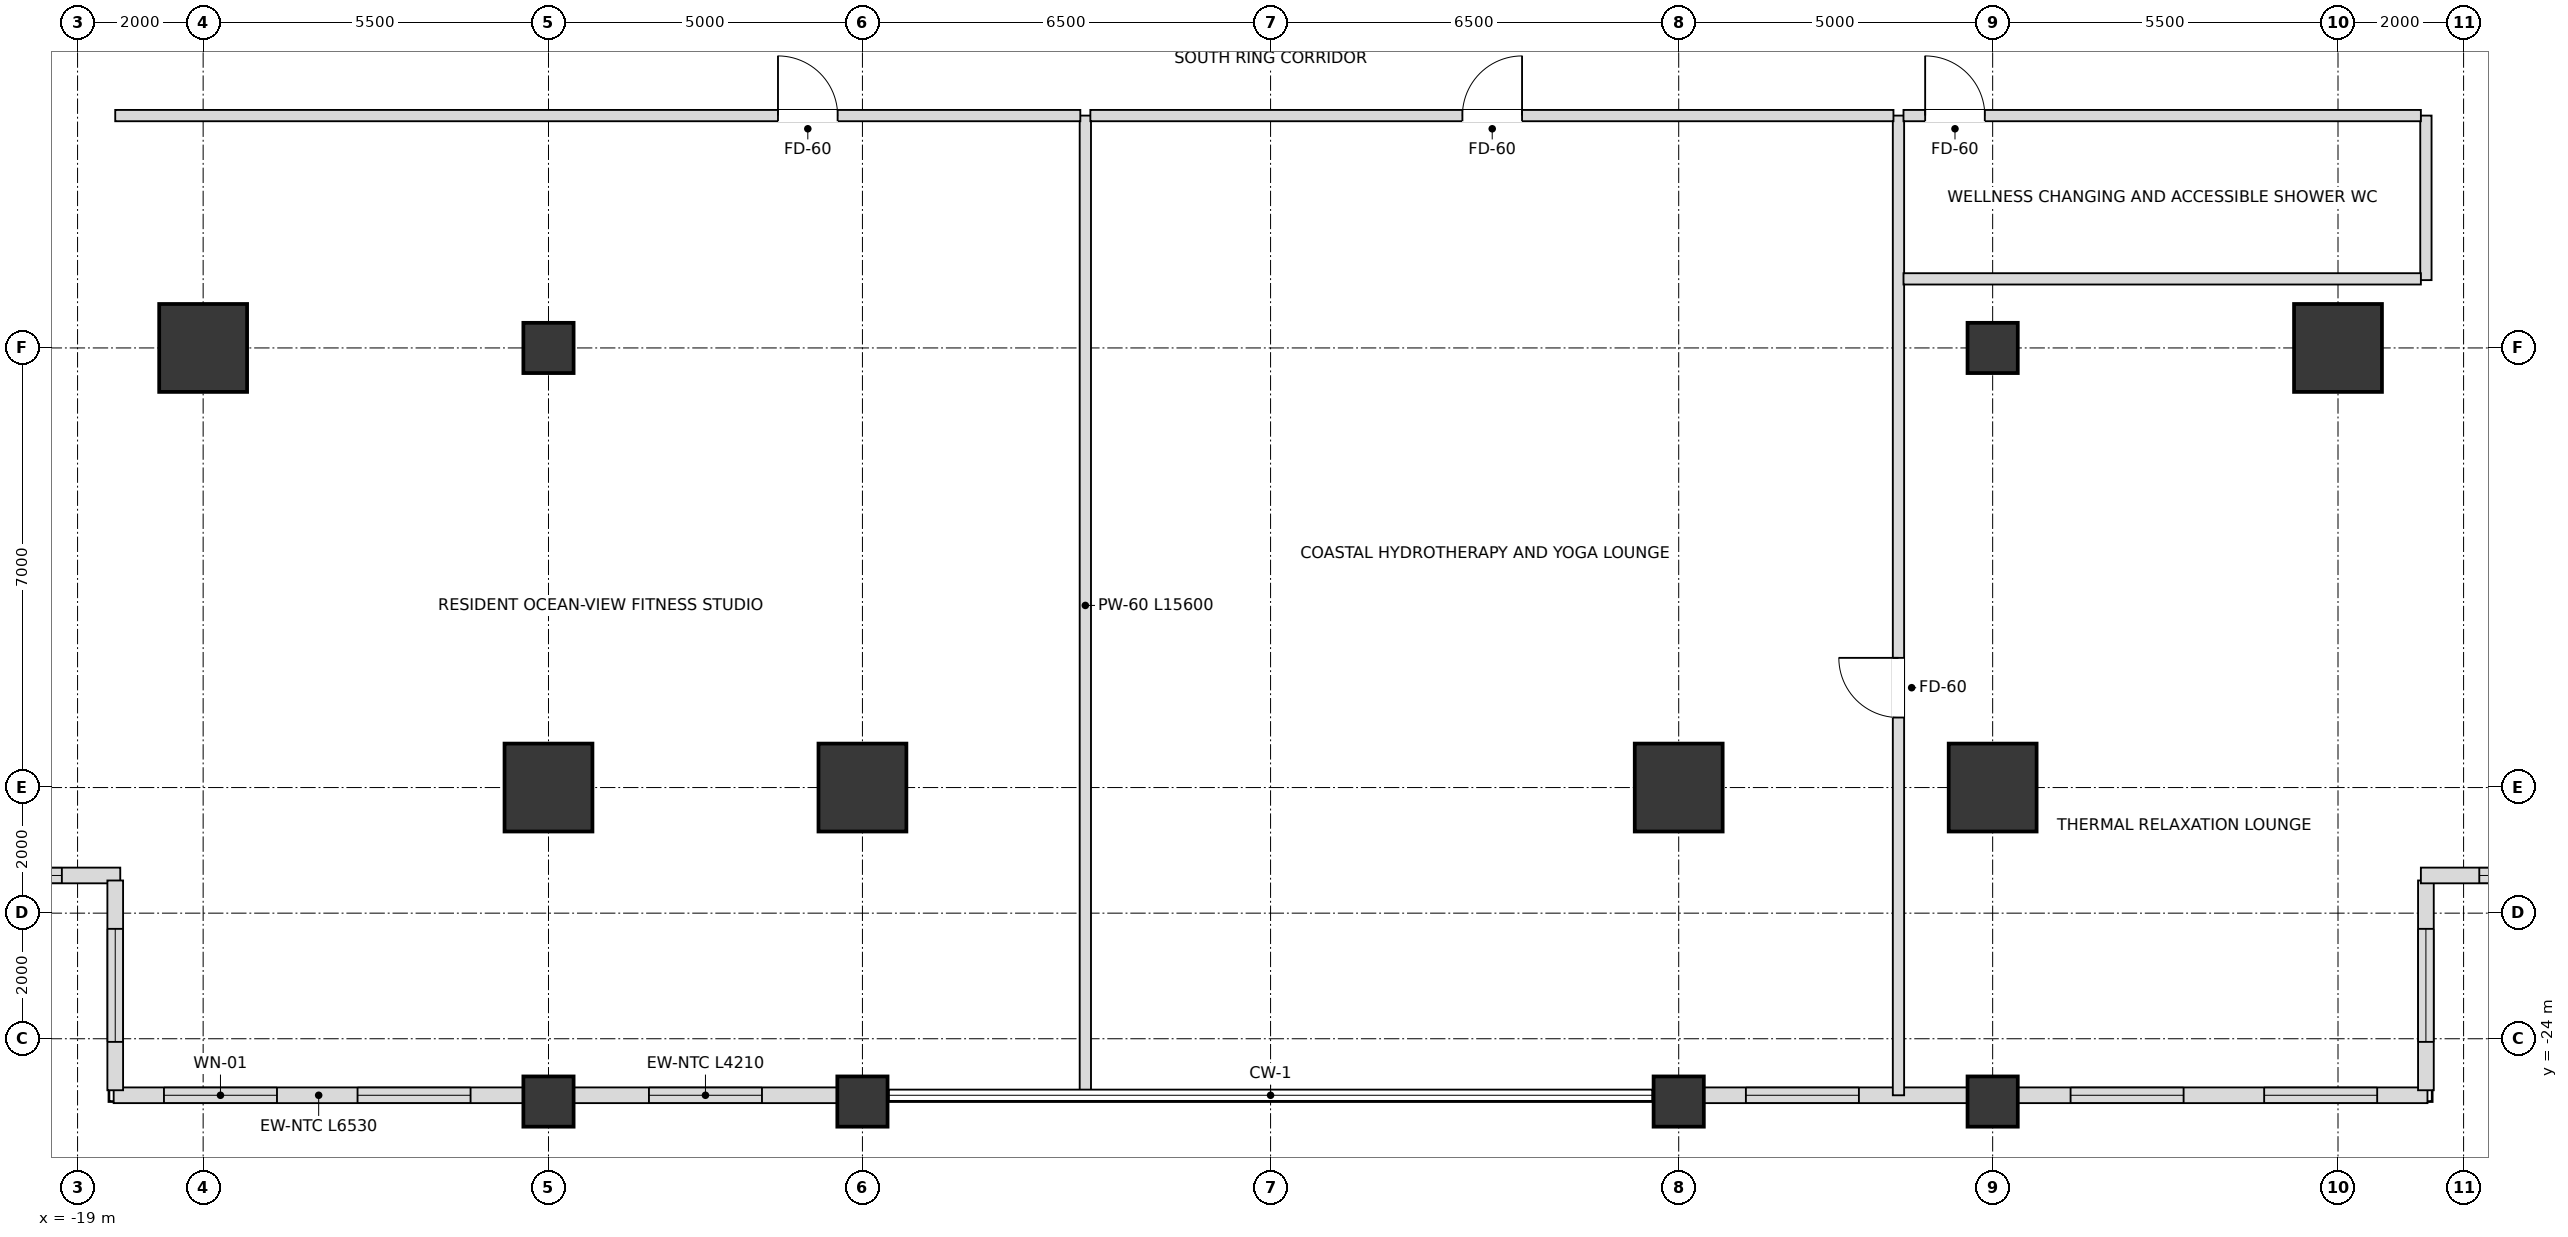
"""IFC4 building model, lengths in metres.
Left out: names, types, materials, properties, quantities, classifications, styles, units other than length and angle.
Written with IfcOpenShell. Run it as: python <this file> out.ifc"""

import sys

from ifc_helpers import new_model, si_unit, direction, frame, frame_2d, origin, origin_2d, place, context, subcontext, project, spatial, rectangle, extrude, element, fill, save


model = new_model("IFC4")
c1 = context("Model", 3, precision=1e-05, world=origin(), true_north=direction((0.0, 1.0)))
c2 = subcontext(c1, "Body", "Model", "MODEL_VIEW")
j1 = project(units=[si_unit("LENGTHUNIT", "METRE"), si_unit("PLANEANGLEUNIT", "RADIAN")], contexts=[c1])
p1 = place(None, origin())
s1 = spatial("IfcSite", under=j1, at=p1, CompositionType="ELEMENT")
p2 = place(p1, origin())
s2 = spatial("IfcBuilding", under=s1, at=p2, CompositionType="ELEMENT")
p3 = place(p2, frame((0.0, 0.0, 86.4)))
s3 = spatial("IfcBuildingStorey", under=s2, at=p3, CompositionType="ELEMENT", Elevation=86.4)
for number, where, z_axis, x_axis in (
    (1, (-11.5, -20.0, 0.0), (0.0, 0.0, 1.0), (1.0, 0.0, 0.0)),
    (2, (-6.5, -20.0, 0.0), (0.0, 0.0, 1.0), (1.0, 0.0, 0.0)),
    (3, (6.5, -20.0, 0.0), (0.0, 0.0, 1.0), (1.0, 0.0, 0.0)),
    (4, (11.5, -20.0, 0.0), (0.0, 0.0, 1.0), (1.0, 0.0, 0.0)),
    (5, (17.0, -13.0, 0.0), (0.0, 0.0, 1.0), (1.0, 0.0, 0.0)),
    (6, (-17.0, -13.0, 0.0), (0.0, 0.0, 1.0), (1.0, 0.0, 0.0)),
):
    element("IfcColumn", number, at=place(p3, frame(where, z_axis=z_axis, x_axis=x_axis)), inside=s3, PredefinedType="USERDEFINED", context=c2, shape_type="SweptSolid", body=[
        extrude(rectangle(XDim=1.4, YDim=1.4, at=origin_2d()), origin(), (0.0, 0.0, 1.0), 3.6),
    ])
for number, where, z_axis, x_axis in (
    (7, (-11.5, -13.0, 0.0), (0.0, 0.0, 1.0), (1.0, 0.0, 0.0)),
    (8, (11.5, -13.0, 0.0), (0.0, 0.0, 1.0), (1.0, 0.0, 0.0)),
    (9, (-11.5, -25.0, 0.0), (0.0, 0.0, 1.0), (1.0, 0.0, 0.0)),
    (10, (-6.5, -25.0, 0.0), (0.0, 0.0, 1.0), (1.0, 0.0, 0.0)),
    (11, (6.5, -25.0, 0.0), (0.0, 0.0, 1.0), (1.0, 0.0, 0.0)),
    (12, (11.5, -25.0, 0.0), (0.0, 0.0, 1.0), (1.0, 0.0, 0.0)),
):
    element("IfcColumn", number, at=place(p3, frame(where, z_axis=z_axis, x_axis=x_axis)), inside=s3, PredefinedType="COLUMN", context=c2, shape_type="SweptSolid", body=[
        extrude(rectangle(XDim=0.8, YDim=0.8, at=origin_2d()), origin(), (0.0, 0.0, 1.0), 3.6),
    ])
p4 = place(p3, frame((-18.425, -24.9, 0.0), z_axis=(0.0, 0.0, 1.0), x_axis=(1.0, 0.0, 0.0)))
e13 = element("IfcWall", 13, at=p4, inside=s3, PredefinedType="SOLIDWALL", context=c2, shape_type="SweptSolid", body=[
    extrude(rectangle(XDim=6.53, YDim=0.25, at=frame_2d((3.265, 0.0))), origin(), (0.0, 0.0, 1.0), 2.736),
])
p5 = place(p4, frame((0.801, 0.0, 0.72)))
e14 = element("IfcOpeningElement", 14, at=p5, cuts=e13, PredefinedType="OPENING", context=c2, shape_type="SweptSolid", body=[
    extrude(rectangle(XDim=1.8, YDim=1.68, at=frame_2d((0.9, 0.84))), frame((0.0, 0.135, 0.0), z_axis=(0.0, -1.0, 0.0), x_axis=(1.0, 0.0, 0.0)), (0.0, 0.0, 1.0), 0.27),
])
p6 = place(p4, frame((3.884, 0.0, 0.72)))
e15 = element("IfcOpeningElement", 15, at=p6, cuts=e13, PredefinedType="OPENING", context=c2, shape_type="SweptSolid", body=[
    extrude(rectangle(XDim=1.8, YDim=1.68, at=frame_2d((0.9, 0.84))), frame((0.0, 0.135, 0.0), z_axis=(0.0, -1.0, 0.0), x_axis=(1.0, 0.0, 0.0)), (0.0, 0.0, 1.0), 0.27),
])
p7 = place(p3, frame((-11.105, -24.9, 0.0), z_axis=(0.0, 0.0, 1.0), x_axis=(1.0, 0.0, 0.0)))
e16 = element("IfcWall", 16, at=p7, inside=s3, PredefinedType="SOLIDWALL", context=c2, shape_type="SweptSolid", body=[
    extrude(rectangle(XDim=4.21, YDim=0.25, at=frame_2d((2.105, 0.0))), origin(), (0.0, 0.0, 1.0), 2.736),
])
p8 = place(p7, frame((1.205, 0.0, 0.72)))
e17 = element("IfcOpeningElement", 17, at=p8, cuts=e16, PredefinedType="OPENING", context=c2, shape_type="SweptSolid", body=[
    extrude(rectangle(XDim=1.8, YDim=1.68, at=frame_2d((0.9, 0.84))), frame((0.0, 0.135, 0.0), z_axis=(0.0, -1.0, 0.0), x_axis=(1.0, 0.0, 0.0)), (0.0, 0.0, 1.0), 0.27),
])
p9 = place(p3, frame((6.895, -24.9, 0.0), z_axis=(0.0, 0.0, 1.0), x_axis=(1.0, 0.0, 0.0)))
e18 = element("IfcWall", 18, at=p9, inside=s3, PredefinedType="SOLIDWALL", context=c2, shape_type="SweptSolid", body=[
    extrude(rectangle(XDim=4.21, YDim=0.25, at=frame_2d((2.105, 0.0))), origin(), (0.0, 0.0, 1.0), 2.736),
])
p10 = place(p9, frame((0.675, 0.0, 0.72)))
e19 = element("IfcOpeningElement", 19, at=p10, cuts=e18, PredefinedType="OPENING", context=c2, shape_type="SweptSolid", body=[
    extrude(rectangle(XDim=1.8, YDim=1.68, at=frame_2d((0.9, 0.84))), frame((0.0, 0.135, 0.0), z_axis=(0.0, -1.0, 0.0), x_axis=(1.0, 0.0, 0.0)), (0.0, 0.0, 1.0), 0.27),
])
p11 = place(p3, frame((11.895, -24.9, 0.0), z_axis=(0.0, 0.0, 1.0), x_axis=(1.0, 0.0, 0.0)))
e20 = element("IfcWall", 20, at=p11, inside=s3, PredefinedType="SOLIDWALL", context=c2, shape_type="SweptSolid", body=[
    extrude(rectangle(XDim=6.53, YDim=0.25, at=frame_2d((3.265, 0.0))), origin(), (0.0, 0.0, 1.0), 2.736),
])
p12 = place(p11, frame((0.846, 0.0, 0.72)))
e21 = element("IfcOpeningElement", 21, at=p12, cuts=e20, PredefinedType="OPENING", context=c2, shape_type="SweptSolid", body=[
    extrude(rectangle(XDim=1.8, YDim=1.68, at=frame_2d((0.9, 0.84))), frame((0.0, 0.135, 0.0), z_axis=(0.0, -1.0, 0.0), x_axis=(1.0, 0.0, 0.0)), (0.0, 0.0, 1.0), 0.27),
])
p13 = place(p11, frame((3.929, 0.0, 0.72)))
e22 = element("IfcOpeningElement", 22, at=p13, cuts=e20, PredefinedType="OPENING", context=c2, shape_type="SweptSolid", body=[
    extrude(rectangle(XDim=1.8, YDim=1.68, at=frame_2d((0.9, 0.84))), frame((0.0, 0.135, 0.0), z_axis=(0.0, -1.0, 0.0), x_axis=(1.0, 0.0, 0.0)), (0.0, 0.0, 1.0), 0.27),
])
p14 = place(p3, frame((-21.98, -21.4, 0.0), z_axis=(0.0, 0.0, 1.0), x_axis=(1.0, 0.0, 0.0)))
e23 = element("IfcWall", 23, at=p14, inside=s3, PredefinedType="SOLIDWALL", context=c2, shape_type="SweptSolid", body=[
    extrude(rectangle(XDim=3.66, YDim=0.25, at=frame_2d((1.83, 0.0))), origin(), (0.0, 0.0, 1.0), 2.736),
])
p15 = place(p14, frame((0.93, 0.0, 0.72)))
e24 = element("IfcOpeningElement", 24, at=p15, cuts=e23, PredefinedType="OPENING", context=c2, shape_type="SweptSolid", body=[
    extrude(rectangle(XDim=1.8, YDim=1.68, at=frame_2d((0.9, 0.84))), frame((0.0, 0.135, 0.0), z_axis=(0.0, -1.0, 0.0), x_axis=(1.0, 0.0, 0.0)), (0.0, 0.0, 1.0), 0.27),
])
p16 = place(p3, frame((-18.4, -21.48, 0.0), z_axis=(0.0, 0.0, 1.0), x_axis=(0.0, -1.0, 0.0)))
e25 = element("IfcWall", 25, at=p16, inside=s3, PredefinedType="SOLIDWALL", context=c2, shape_type="SweptSolid", body=[
    extrude(rectangle(XDim=3.34, YDim=0.25, at=frame_2d((1.67, 0.0))), origin(), (0.0, 0.0, 1.0), 2.736),
])
p17 = place(p16, frame((0.77, 0.0, 0.72)))
e26 = element("IfcOpeningElement", 26, at=p17, cuts=e25, PredefinedType="OPENING", context=c2, shape_type="SweptSolid", body=[
    extrude(rectangle(XDim=1.8, YDim=1.68, at=frame_2d((0.9, 0.84))), frame((0.0, 0.135, 0.0), z_axis=(0.0, -1.0, 0.0), x_axis=(1.0, 0.0, 0.0)), (0.0, 0.0, 1.0), 0.27),
])
p18 = place(p3, frame((18.4, -24.82, 0.0), z_axis=(0.0, 0.0, 1.0), x_axis=(0.0, 1.0, 0.0)))
e27 = element("IfcWall", 27, at=p18, inside=s3, PredefinedType="SOLIDWALL", context=c2, shape_type="SweptSolid", body=[
    extrude(rectangle(XDim=3.34, YDim=0.25, at=frame_2d((1.67, 0.0))), origin(), (0.0, 0.0, 1.0), 2.736),
])
p19 = place(p18, frame((0.77, 0.0, 0.72)))
e28 = element("IfcOpeningElement", 28, at=p19, cuts=e27, PredefinedType="OPENING", context=c2, shape_type="SweptSolid", body=[
    extrude(rectangle(XDim=1.8, YDim=1.68, at=frame_2d((0.9, 0.84))), frame((0.0, 0.135, 0.0), z_axis=(0.0, -1.0, 0.0), x_axis=(1.0, 0.0, 0.0)), (0.0, 0.0, 1.0), 0.27),
])
p20 = place(p3, frame((18.32, -21.4, 0.0), z_axis=(0.0, 0.0, 1.0), x_axis=(1.0, 0.0, 0.0)))
e29 = element("IfcWall", 29, at=p20, inside=s3, PredefinedType="SOLIDWALL", context=c2, shape_type="SweptSolid", body=[
    extrude(rectangle(XDim=3.66, YDim=0.25, at=frame_2d((1.83, 0.0))), origin(), (0.0, 0.0, 1.0), 2.736),
])
p21 = place(p20, frame((0.93, 0.0, 0.72)))
e30 = element("IfcOpeningElement", 30, at=p21, cuts=e29, PredefinedType="OPENING", context=c2, shape_type="SweptSolid", body=[
    extrude(rectangle(XDim=1.8, YDim=1.68, at=frame_2d((0.9, 0.84))), frame((0.0, 0.135, 0.0), z_axis=(0.0, -1.0, 0.0), x_axis=(1.0, 0.0, 0.0)), (0.0, 0.0, 1.0), 0.27),
])
p22 = place(p3, frame((-2.95, -24.9, 0.0), z_axis=(0.0, 0.0, 1.0), x_axis=(0.0, 1.0, 0.0)))
e31 = element("IfcWall", 31, at=p22, inside=s3, PredefinedType="PARTITIONING", context=c2, shape_type="SweptSolid", body=[
    extrude(rectangle(XDim=15.6, YDim=0.18, at=frame_2d((7.8, 0.0))), origin(), (0.0, 0.0, 1.0), 2.816),
])
p23 = place(p3, frame((10.0, -24.9, 0.0), z_axis=(0.0, 0.0, 1.0), x_axis=(0.0, 1.0, 0.0)))
e32 = element("IfcWall", 32, at=p23, inside=s3, PredefinedType="PARTITIONING", context=c2, shape_type="SweptSolid", body=[
    extrude(rectangle(XDim=15.6, YDim=0.18, at=frame_2d((7.8, 0.0))), origin(), (0.0, 0.0, 1.0), 2.816),
])
p24 = place(p23, frame((6.015, 0.0, 0.0)))
e33 = element("IfcOpeningElement", 33, at=p24, cuts=e32, PredefinedType="OPENING", context=c2, shape_type="SweptSolid", body=[
    extrude(rectangle(XDim=0.95, YDim=2.15, at=frame_2d((0.475, 1.075))), frame((0.0, 0.1, 0.0), z_axis=(0.0, -1.0, 0.0), x_axis=(1.0, 0.0, 0.0)), (0.0, 0.0, 1.0), 0.2),
])
p25 = place(p3, frame((18.4, -11.92, 0.0), z_axis=(0.0, 0.0, 1.0), x_axis=(0.0, 1.0, 0.0)))
e34 = element("IfcWall", 34, at=p25, inside=s3, PredefinedType="PARTITIONING", context=c2, shape_type="SweptSolid", body=[
    extrude(rectangle(XDim=2.62, YDim=0.18, at=frame_2d((1.31, 0.0))), origin(), (0.0, 0.0, 1.0), 3.38),
])
p26 = place(p3, frame((10.08, -11.9, 0.0), z_axis=(0.0, 0.0, 1.0), x_axis=(1.0, 0.0, 0.0)))
e35 = element("IfcWall", 35, at=p26, inside=s3, PredefinedType="PARTITIONING", context=c2, shape_type="SweptSolid", body=[
    extrude(rectangle(XDim=8.24, YDim=0.18, at=frame_2d((4.12, 0.0))), origin(), (0.0, 0.0, 1.0), 2.816),
])
p27 = place(p3, frame((-18.4, -9.3, 0.0), z_axis=(0.0, 0.0, 1.0), x_axis=(1.0, 0.0, 0.0)))
e36 = element("IfcWall", 36, at=p27, inside=s3, PredefinedType="PARTITIONING", context=c2, shape_type="SweptSolid", body=[
    extrude(rectangle(XDim=15.37, YDim=0.18, at=frame_2d((7.685, 0.0))), origin(), (0.0, 0.0, 1.0), 2.816),
])
p28 = place(p27, frame((10.555, 0.0, 0.0)))
e37 = element("IfcOpeningElement", 37, at=p28, cuts=e36, PredefinedType="OPENING", context=c2, shape_type="SweptSolid", body=[
    extrude(rectangle(XDim=0.95, YDim=2.15, at=frame_2d((0.475, 1.075))), frame((0.0, 0.1, 0.0), z_axis=(0.0, -1.0, 0.0), x_axis=(1.0, 0.0, 0.0)), (0.0, 0.0, 1.0), 0.2),
])
p29 = place(p3, frame((-2.87, -9.3, 0.0), z_axis=(0.0, 0.0, 1.0), x_axis=(1.0, 0.0, 0.0)))
e38 = element("IfcWall", 38, at=p29, inside=s3, PredefinedType="PARTITIONING", context=c2, shape_type="SweptSolid", body=[
    extrude(rectangle(XDim=12.79, YDim=0.18, at=frame_2d((6.395, 0.0))), origin(), (0.0, 0.0, 1.0), 2.816),
])
p30 = place(p29, frame((5.925, 0.0, 0.0)))
e39 = element("IfcOpeningElement", 39, at=p30, cuts=e38, PredefinedType="OPENING", context=c2, shape_type="SweptSolid", body=[
    extrude(rectangle(XDim=0.95, YDim=2.15, at=frame_2d((0.475, 1.075))), frame((0.0, 0.1, 0.0), z_axis=(0.0, -1.0, 0.0), x_axis=(1.0, 0.0, 0.0)), (0.0, 0.0, 1.0), 0.2),
])
p31 = place(p3, frame((10.08, -9.3, 0.0), z_axis=(0.0, 0.0, 1.0), x_axis=(1.0, 0.0, 0.0)))
e40 = element("IfcWall", 40, at=p31, inside=s3, PredefinedType="PARTITIONING", context=c2, shape_type="SweptSolid", body=[
    extrude(rectangle(XDim=8.24, YDim=0.18, at=frame_2d((4.12, 0.0))), origin(), (0.0, 0.0, 1.0), 2.816),
])
p32 = place(p31, frame((0.345, 0.0, 0.0)))
e41 = element("IfcOpeningElement", 41, at=p32, cuts=e40, PredefinedType="OPENING", context=c2, shape_type="SweptSolid", body=[
    extrude(rectangle(XDim=0.95, YDim=2.15, at=frame_2d((0.475, 1.075))), frame((0.0, 0.1, 0.0), z_axis=(0.0, -1.0, 0.0), x_axis=(1.0, 0.0, 0.0)), (0.0, 0.0, 1.0), 0.2),
])
p33 = place(p5, origin())
e42 = element("IfcWindow", 42, at=p33, inside=s3, PartitioningType="SINGLE_PANEL", PredefinedType="WINDOW", context=c2, shape_type="SweptSolid", body=[
    extrude(rectangle(XDim=1.8, YDim=1.68, at=frame_2d((0.9, 0.84))), frame((0.0, 0.03, 0.0), z_axis=(0.0, -1.0, 0.0), x_axis=(1.0, 0.0, 0.0)), (0.0, 0.0, 1.0), 0.06),
])
fill(e14, e42)
p34 = place(p6, origin())
e43 = element("IfcWindow", 43, at=p34, inside=s3, PartitioningType="SINGLE_PANEL", PredefinedType="WINDOW", context=c2, shape_type="SweptSolid", body=[
    extrude(rectangle(XDim=1.8, YDim=1.68, at=frame_2d((0.9, 0.84))), frame((0.0, 0.03, 0.0), z_axis=(0.0, -1.0, 0.0), x_axis=(1.0, 0.0, 0.0)), (0.0, 0.0, 1.0), 0.06),
])
fill(e15, e43)
p35 = place(p8, origin())
e44 = element("IfcWindow", 44, at=p35, inside=s3, PartitioningType="SINGLE_PANEL", PredefinedType="WINDOW", context=c2, shape_type="SweptSolid", body=[
    extrude(rectangle(XDim=1.8, YDim=1.68, at=frame_2d((0.9, 0.84))), frame((0.0, 0.03, 0.0), z_axis=(0.0, -1.0, 0.0), x_axis=(1.0, 0.0, 0.0)), (0.0, 0.0, 1.0), 0.06),
])
fill(e17, e44)
p36 = place(p10, origin())
e45 = element("IfcWindow", 45, at=p36, inside=s3, PartitioningType="SINGLE_PANEL", PredefinedType="WINDOW", context=c2, shape_type="SweptSolid", body=[
    extrude(rectangle(XDim=1.8, YDim=1.68, at=frame_2d((0.9, 0.84))), frame((0.0, 0.03, 0.0), z_axis=(0.0, -1.0, 0.0), x_axis=(1.0, 0.0, 0.0)), (0.0, 0.0, 1.0), 0.06),
])
fill(e19, e45)
p37 = place(p12, origin())
e46 = element("IfcWindow", 46, at=p37, inside=s3, PartitioningType="SINGLE_PANEL", PredefinedType="WINDOW", context=c2, shape_type="SweptSolid", body=[
    extrude(rectangle(XDim=1.8, YDim=1.68, at=frame_2d((0.9, 0.84))), frame((0.0, 0.03, 0.0), z_axis=(0.0, -1.0, 0.0), x_axis=(1.0, 0.0, 0.0)), (0.0, 0.0, 1.0), 0.06),
])
fill(e21, e46)
p38 = place(p13, origin())
e47 = element("IfcWindow", 47, at=p38, inside=s3, PartitioningType="SINGLE_PANEL", PredefinedType="WINDOW", context=c2, shape_type="SweptSolid", body=[
    extrude(rectangle(XDim=1.8, YDim=1.68, at=frame_2d((0.9, 0.84))), frame((0.0, 0.03, 0.0), z_axis=(0.0, -1.0, 0.0), x_axis=(1.0, 0.0, 0.0)), (0.0, 0.0, 1.0), 0.06),
])
fill(e22, e47)
p39 = place(p15, origin())
e48 = element("IfcWindow", 48, at=p39, inside=s3, PartitioningType="SINGLE_PANEL", PredefinedType="WINDOW", context=c2, shape_type="SweptSolid", body=[
    extrude(rectangle(XDim=1.8, YDim=1.68, at=frame_2d((0.9, 0.84))), frame((0.0, 0.03, 0.0), z_axis=(0.0, -1.0, 0.0), x_axis=(1.0, 0.0, 0.0)), (0.0, 0.0, 1.0), 0.06),
])
fill(e24, e48)
p40 = place(p17, origin())
e49 = element("IfcWindow", 49, at=p40, inside=s3, PartitioningType="SINGLE_PANEL", PredefinedType="WINDOW", context=c2, shape_type="SweptSolid", body=[
    extrude(rectangle(XDim=1.8, YDim=1.68, at=frame_2d((0.9, 0.84))), frame((0.0, 0.03, 0.0), z_axis=(0.0, -1.0, 0.0), x_axis=(1.0, 0.0, 0.0)), (0.0, 0.0, 1.0), 0.06),
])
fill(e26, e49)
p41 = place(p19, origin())
e50 = element("IfcWindow", 50, at=p41, inside=s3, PartitioningType="SINGLE_PANEL", PredefinedType="WINDOW", context=c2, shape_type="SweptSolid", body=[
    extrude(rectangle(XDim=1.8, YDim=1.68, at=frame_2d((0.9, 0.84))), frame((0.0, 0.03, 0.0), z_axis=(0.0, -1.0, 0.0), x_axis=(1.0, 0.0, 0.0)), (0.0, 0.0, 1.0), 0.06),
])
fill(e28, e50)
p42 = place(p21, origin())
e51 = element("IfcWindow", 51, at=p42, inside=s3, PartitioningType="SINGLE_PANEL", PredefinedType="WINDOW", context=c2, shape_type="SweptSolid", body=[
    extrude(rectangle(XDim=1.8, YDim=1.68, at=frame_2d((0.9, 0.84))), frame((0.0, 0.03, 0.0), z_axis=(0.0, -1.0, 0.0), x_axis=(1.0, 0.0, 0.0)), (0.0, 0.0, 1.0), 0.06),
])
fill(e30, e51)
p43 = place(p32, origin())
e52 = element("IfcDoor", 52, at=p43, inside=s3, OperationType="SINGLE_SWING_LEFT", PredefinedType="DOOR", context=c2, shape_type="SweptSolid", body=[
    extrude(rectangle(XDim=0.95, YDim=2.15, at=frame_2d((0.475, 1.075))), frame((0.0, 0.025, 0.0), z_axis=(0.0, -1.0, 0.0), x_axis=(1.0, 0.0, 0.0)), (0.0, 0.0, 1.0), 0.05),
])
fill(e41, e52)
p44 = place(p24, origin())
e53 = element("IfcDoor", 53, at=p44, inside=s3, OperationType="SINGLE_SWING_RIGHT", PredefinedType="DOOR", context=c2, shape_type="SweptSolid", body=[
    extrude(rectangle(XDim=0.95, YDim=2.15, at=frame_2d((0.475, 1.075))), frame((0.0, 0.025, 0.0), z_axis=(0.0, -1.0, 0.0), x_axis=(1.0, 0.0, 0.0)), (0.0, 0.0, 1.0), 0.05),
])
fill(e33, e53)
p45 = place(p28, origin())
e54 = element("IfcDoor", 54, at=p45, inside=s3, OperationType="SINGLE_SWING_LEFT", PredefinedType="DOOR", context=c2, shape_type="SweptSolid", body=[
    extrude(rectangle(XDim=0.95, YDim=2.15, at=frame_2d((0.475, 1.075))), frame((0.0, 0.025, 0.0), z_axis=(0.0, -1.0, 0.0), x_axis=(1.0, 0.0, 0.0)), (0.0, 0.0, 1.0), 0.05),
])
fill(e37, e54)
p46 = place(p30, origin())
e55 = element("IfcDoor", 55, at=p46, inside=s3, OperationType="SINGLE_SWING_RIGHT", PredefinedType="DOOR", context=c2, shape_type="SweptSolid", body=[
    extrude(rectangle(XDim=0.95, YDim=2.15, at=frame_2d((0.475, 1.075))), frame((0.0, 0.025, 0.0), z_axis=(0.0, -1.0, 0.0), x_axis=(1.0, 0.0, 0.0)), (0.0, 0.0, 1.0), 0.05),
])
fill(e39, e55)
save(model, sys.argv[1])
